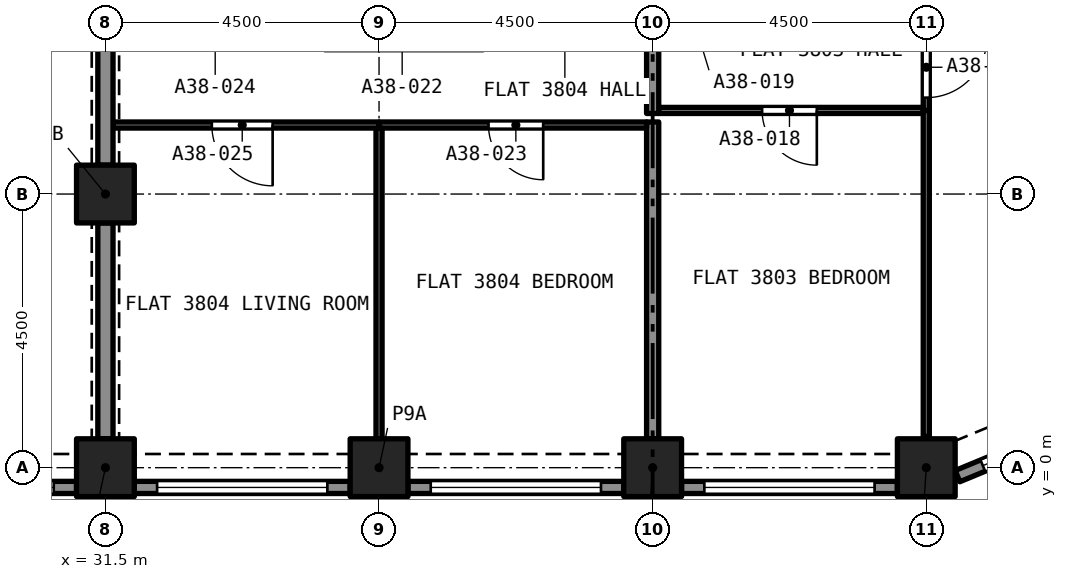
"""IFC4 building model, lengths in metres.
Left out: names, types, materials, properties, quantities, classifications, styles, units other than length and angle.
Written with IfcOpenShell. Run it as: python <this file> out.ifc"""

import sys

from ifc_helpers import new_model, si_unit, direction, frame, frame_2d, origin, origin_2d, place, context, subcontext, project, spatial, rectangle, extrude, element, fill, save


model = new_model("IFC4")
c1 = context("Model", 3, precision=1e-05, world=origin(), true_north=direction((0.0, 1.0)))
c2 = subcontext(c1, "Body", "Model", "MODEL_VIEW")
j1 = project(units=[si_unit("LENGTHUNIT", "METRE"), si_unit("PLANEANGLEUNIT", "RADIAN")], contexts=[c1])
p1 = place(None, origin())
s1 = spatial("IfcSite", under=j1, at=p1, CompositionType="ELEMENT")
p2 = place(p1, origin())
s2 = spatial("IfcBuilding", under=s1, at=p2, CompositionType="ELEMENT")
p3 = place(p2, frame((0.0, 0.0, 136.6)))
s3 = spatial("IfcBuildingStorey", under=s2, at=p3, CompositionType="ELEMENT", Elevation=136.6)
for number, where, z_axis, x_axis in (
    (1, (31.5, 0.0, 0.0), (0.0, 0.0, 1.0), (1.0, 0.0, 0.0)),
    (2, (36.0, 0.0, 0.0), (0.0, 0.0, 1.0), (1.0, 0.0, 0.0)),
    (3, (40.5, 0.0, 0.0), (0.0, 0.0, 1.0), (1.0, 0.0, 0.0)),
    (4, (45.0, 0.0, 0.0), (0.0, 0.0, 1.0), (1.0, 0.0, 0.0)),
    (5, (31.5, 4.5, 0.0), (0.0, 0.0, 1.0), (1.0, 0.0, 0.0)),
):
    element("IfcColumn", number, at=place(p3, frame(where, z_axis=z_axis, x_axis=x_axis)), inside=s3, PredefinedType="COLUMN", context=c2, shape_type="SweptSolid", body=[
        extrude(rectangle(XDim=0.95, YDim=0.95, at=origin_2d()), origin(), (0.0, 0.0, 1.0), 3.2),
    ])
p4 = place(p3, frame((31.025, -0.325, 0.0), z_axis=(0.0, 0.0, 1.0), x_axis=(-1.0, 0.0, 0.0)))
e6 = element("IfcWall", 6, at=p4, inside=s3, PredefinedType="SOLIDWALL", context=c2, shape_type="SweptSolid", body=[
    extrude(rectangle(XDim=3.55, YDim=0.2, at=frame_2d((1.775, 0.0))), origin(), (0.0, 0.0, 1.0), 3.2),
])
p5 = place(p4, frame((0.375, 0.0, 0.45)))
e7 = element("IfcOpeningElement", 7, at=p5, cuts=e6, PredefinedType="OPENING", context=c2, shape_type="SweptSolid", body=[
    extrude(rectangle(XDim=2.8, YDim=1.95, at=frame_2d((1.4, 0.975))), frame((0.0, 0.11, 0.0), z_axis=(0.0, -1.0, 0.0), x_axis=(1.0, 0.0, 0.0)), (0.0, 0.0, 1.0), 0.22),
])
p6 = place(p3, frame((35.525, -0.325, 0.0), z_axis=(0.0, 0.0, 1.0), x_axis=(-1.0, 0.0, 0.0)))
e8 = element("IfcWall", 8, at=p6, inside=s3, PredefinedType="SOLIDWALL", context=c2, shape_type="SweptSolid", body=[
    extrude(rectangle(XDim=3.55, YDim=0.2, at=frame_2d((1.775, 0.0))), origin(), (0.0, 0.0, 1.0), 3.2),
])
p7 = place(p6, frame((0.375, 0.0, 0.45)))
e9 = element("IfcOpeningElement", 9, at=p7, cuts=e8, PredefinedType="OPENING", context=c2, shape_type="SweptSolid", body=[
    extrude(rectangle(XDim=2.8, YDim=1.95, at=frame_2d((1.4, 0.975))), frame((0.0, 0.11, 0.0), z_axis=(0.0, -1.0, 0.0), x_axis=(1.0, 0.0, 0.0)), (0.0, 0.0, 1.0), 0.22),
])
p8 = place(p3, frame((40.025, -0.325, 0.0), z_axis=(0.0, 0.0, 1.0), x_axis=(-1.0, 0.0, 0.0)))
e10 = element("IfcWall", 10, at=p8, inside=s3, PredefinedType="SOLIDWALL", context=c2, shape_type="SweptSolid", body=[
    extrude(rectangle(XDim=3.55, YDim=0.2, at=frame_2d((1.775, 0.0))), origin(), (0.0, 0.0, 1.0), 3.2),
])
p9 = place(p8, frame((0.375, 0.0, 0.45)))
e11 = element("IfcOpeningElement", 11, at=p9, cuts=e10, PredefinedType="OPENING", context=c2, shape_type="SweptSolid", body=[
    extrude(rectangle(XDim=2.8, YDim=1.95, at=frame_2d((1.4, 0.975))), frame((0.0, 0.11, 0.0), z_axis=(0.0, -1.0, 0.0), x_axis=(1.0, 0.0, 0.0)), (0.0, 0.0, 1.0), 0.22),
])
p10 = place(p3, frame((44.525, -0.325, 0.0), z_axis=(0.0, 0.0, 1.0), x_axis=(-1.0, 0.0, 0.0)))
e12 = element("IfcWall", 12, at=p10, inside=s3, PredefinedType="SOLIDWALL", context=c2, shape_type="SweptSolid", body=[
    extrude(rectangle(XDim=3.55, YDim=0.2, at=frame_2d((1.775, 0.0))), origin(), (0.0, 0.0, 1.0), 3.2),
])
p11 = place(p10, frame((0.375, 0.0, 0.45)))
e13 = element("IfcOpeningElement", 13, at=p11, cuts=e12, PredefinedType="OPENING", context=c2, shape_type="SweptSolid", body=[
    extrude(rectangle(XDim=2.8, YDim=1.95, at=frame_2d((1.4, 0.975))), frame((0.0, 0.11, 0.0), z_axis=(0.0, -1.0, 0.0), x_axis=(1.0, 0.0, 0.0)), (0.0, 0.0, 1.0), 0.22),
])
p12 = place(p3, frame((47.733, 0.78, 0.0), z_axis=(0.0, 0.0, 1.0), x_axis=(-0.923880599843, -0.382680855588, 0.0)))
e14 = element("IfcWall", 14, at=p12, inside=s3, PredefinedType="SOLIDWALL", context=c2, shape_type="SweptSolid", body=[
    extrude(rectangle(XDim=2.403, YDim=0.2, at=frame_2d((1.201, 0.0))), origin(), (0.0, 0.0, 1.0), 3.2),
])
p13 = place(p12, frame((0.251, 0.0, 0.45)))
e15 = element("IfcOpeningElement", 15, at=p13, cuts=e14, PredefinedType="OPENING", context=c2, shape_type="SweptSolid", body=[
    extrude(rectangle(XDim=1.7, YDim=1.95, at=frame_2d((0.85, 0.975))), frame((0.0, 0.11, 0.0), z_axis=(0.0, -1.0, 0.0), x_axis=(1.0, 0.0, 0.0)), (0.0, 0.0, 1.0), 0.22),
])
p14 = place(p3, frame((44.95, 5.875, 0.0), z_axis=(0.0, 0.0, 1.0), x_axis=(-1.0, 0.0, 0.0)))
e16 = element("IfcWall", 16, at=p14, inside=s3, PredefinedType="PARTITIONING", context=c2, shape_type="SweptSolid", body=[
    extrude(rectangle(XDim=4.35, YDim=0.1, at=frame_2d((2.175, 0.0))), origin(), (0.0, 0.0, 1.0), 2.9),
])
p15 = place(p14, frame((1.75, 0.0, 0.0)))
e17 = element("IfcOpeningElement", 17, at=p15, cuts=e16, PredefinedType="OPENING", context=c2, shape_type="SweptSolid", body=[
    extrude(rectangle(XDim=0.9, YDim=2.1, at=frame_2d((0.45, 1.05))), frame((0.0, 0.06, 0.0), z_axis=(0.0, -1.0, 0.0), x_axis=(1.0, 0.0, 0.0)), (0.0, 0.0, 1.0), 0.12),
])
p16 = place(p3, frame((45.0, 0.514, 0.0), z_axis=(0.0, 0.0, 1.0), x_axis=(0.0, 1.0, 0.0)))
e18 = element("IfcWall", 18, at=p16, inside=s3, PredefinedType="PARTITIONING", context=c2, shape_type="SweptSolid", body=[
    extrude(rectangle(XDim=5.361, YDim=0.1, at=frame_2d((2.68, 0.0))), origin(), (0.0, 0.0, 1.0), 2.9),
])
p17 = place(p3, frame((40.5, 0.475, 0.0), z_axis=(0.0, 0.0, 1.0), x_axis=(0.0, 1.0, 0.0)))
e19 = element("IfcWall", 19, at=p17, inside=s3, PredefinedType="PARTITIONING", context=c2, shape_type="SweptSolid", body=[
    extrude(rectangle(XDim=5.21, YDim=0.2, at=frame_2d((2.605, 0.0))), origin(), (0.0, 0.0, 1.0), 2.9),
])
p18 = place(p3, frame((45.0, 13.9, 0.0), z_axis=(0.0, 0.0, 1.0), x_axis=(0.0, -1.0, 0.0)))
e20 = element("IfcWall", 20, at=p18, inside=s3, PredefinedType="PARTITIONING", context=c2, shape_type="SweptSolid", body=[
    extrude(rectangle(XDim=8.025, YDim=0.1, at=frame_2d((4.012, 0.0))), origin(), (0.0, 0.0, 1.0), 2.9),
])
p19 = place(p18, frame((6.815, 0.0, 0.0)))
e21 = element("IfcOpeningElement", 21, at=p19, cuts=e20, PredefinedType="OPENING", context=c2, shape_type="SweptSolid", body=[
    extrude(rectangle(XDim=1.0, YDim=2.1, at=frame_2d((0.5, 1.05))), frame((0.0, 0.06, 0.0), z_axis=(0.0, -1.0, 0.0), x_axis=(1.0, 0.0, 0.0)), (0.0, 0.0, 1.0), 0.12),
])
p20 = place(p3, frame((40.5, 5.825, 0.0), z_axis=(0.0, 0.0, 1.0), x_axis=(0.0, 1.0, 0.0)))
e22 = element("IfcWall", 22, at=p20, inside=s3, PredefinedType="PARTITIONING", context=c2, shape_type="SweptSolid", body=[
    extrude(rectangle(XDim=8.075, YDim=0.2, at=frame_2d((4.038, 0.0))), origin(), (0.0, 0.0, 1.0), 2.9),
])
p21 = place(p3, frame((40.4, 5.635, 0.0), z_axis=(0.0, 0.0, 1.0), x_axis=(-1.0, 0.0, 0.0)))
e23 = element("IfcWall", 23, at=p21, inside=s3, PredefinedType="PARTITIONING", context=c2, shape_type="SweptSolid", body=[
    extrude(rectangle(XDim=4.4, YDim=0.1, at=frame_2d((2.2, 0.0))), origin(), (0.0, 0.0, 1.0), 2.9),
])
p22 = place(p21, frame((1.7, 0.0, 0.0)))
e24 = element("IfcOpeningElement", 24, at=p22, cuts=e23, PredefinedType="OPENING", context=c2, shape_type="SweptSolid", body=[
    extrude(rectangle(XDim=0.9, YDim=2.1, at=frame_2d((0.45, 1.05))), frame((0.0, 0.06, 0.0), z_axis=(0.0, -1.0, 0.0), x_axis=(1.0, 0.0, 0.0)), (0.0, 0.0, 1.0), 0.12),
])
p23 = place(p3, frame((36.0, 0.475, 0.0), z_axis=(0.0, 0.0, 1.0), x_axis=(0.0, 1.0, 0.0)))
e25 = element("IfcWall", 25, at=p23, inside=s3, PredefinedType="PARTITIONING", context=c2, shape_type="SweptSolid", body=[
    extrude(rectangle(XDim=5.11, YDim=0.1, at=frame_2d((2.555, 0.0))), origin(), (0.0, 0.0, 1.0), 2.9),
])
p24 = place(p3, frame((36.0, 5.635, 0.0), z_axis=(0.0, 0.0, 1.0), x_axis=(-1.0, 0.0, 0.0)))
e26 = element("IfcWall", 26, at=p24, inside=s3, PredefinedType="PARTITIONING", context=c2, shape_type="SweptSolid", body=[
    extrude(rectangle(XDim=4.375, YDim=0.1, at=frame_2d((2.188, 0.0))), origin(), (0.0, 0.0, 1.0), 2.9),
])
p25 = place(p24, frame((1.75, 0.0, 0.0)))
e27 = element("IfcOpeningElement", 27, at=p25, cuts=e26, PredefinedType="OPENING", context=c2, shape_type="SweptSolid", body=[
    extrude(rectangle(XDim=1.0, YDim=2.1, at=frame_2d((0.5, 1.05))), frame((0.0, 0.06, 0.0), z_axis=(0.0, -1.0, 0.0), x_axis=(1.0, 0.0, 0.0)), (0.0, 0.0, 1.0), 0.12),
])
for number, where, z_axis, x_axis in (
    (28, (31.5, 0.475, 0.0), (0.0, 0.0, 1.0), (0.0, 1.0, 0.0)),
    (29, (31.5, 4.975, 0.0), (0.0, 0.0, 1.0), (0.0, 1.0, 0.0)),
):
    element("IfcWall", number, at=place(p3, frame(where, z_axis=z_axis, x_axis=x_axis)), inside=s3, PredefinedType="PARTITIONING", context=c2, shape_type="SweptSolid", body=[
        extrude(rectangle(XDim=3.55, YDim=0.25, at=frame_2d((1.775, 0.0))), origin(), (0.0, 0.0, 1.0), 2.38),
    ])
p26 = place(p5, origin())
e30 = element("IfcWindow", 30, at=p26, inside=s3, PartitioningType="SINGLE_PANEL", PredefinedType="WINDOW", context=c2, shape_type="SweptSolid", body=[
    extrude(rectangle(XDim=2.8, YDim=1.95, at=frame_2d((1.4, 0.975))), frame((0.0, 0.03, 0.0), z_axis=(0.0, -1.0, 0.0), x_axis=(1.0, 0.0, 0.0)), (0.0, 0.0, 1.0), 0.06),
])
fill(e7, e30)
p27 = place(p7, origin())
e31 = element("IfcWindow", 31, at=p27, inside=s3, PartitioningType="SINGLE_PANEL", PredefinedType="WINDOW", context=c2, shape_type="SweptSolid", body=[
    extrude(rectangle(XDim=2.8, YDim=1.95, at=frame_2d((1.4, 0.975))), frame((0.0, 0.03, 0.0), z_axis=(0.0, -1.0, 0.0), x_axis=(1.0, 0.0, 0.0)), (0.0, 0.0, 1.0), 0.06),
])
fill(e9, e31)
p28 = place(p9, origin())
e32 = element("IfcWindow", 32, at=p28, inside=s3, PartitioningType="SINGLE_PANEL", PredefinedType="WINDOW", context=c2, shape_type="SweptSolid", body=[
    extrude(rectangle(XDim=2.8, YDim=1.95, at=frame_2d((1.4, 0.975))), frame((0.0, 0.03, 0.0), z_axis=(0.0, -1.0, 0.0), x_axis=(1.0, 0.0, 0.0)), (0.0, 0.0, 1.0), 0.06),
])
fill(e11, e32)
p29 = place(p11, origin())
e33 = element("IfcWindow", 33, at=p29, inside=s3, PartitioningType="SINGLE_PANEL", PredefinedType="WINDOW", context=c2, shape_type="SweptSolid", body=[
    extrude(rectangle(XDim=2.8, YDim=1.95, at=frame_2d((1.4, 0.975))), frame((0.0, 0.03, 0.0), z_axis=(0.0, -1.0, 0.0), x_axis=(1.0, 0.0, 0.0)), (0.0, 0.0, 1.0), 0.06),
])
fill(e13, e33)
p30 = place(p13, origin())
e34 = element("IfcWindow", 34, at=p30, inside=s3, PartitioningType="SINGLE_PANEL", PredefinedType="WINDOW", context=c2, shape_type="SweptSolid", body=[
    extrude(rectangle(XDim=1.7, YDim=1.95, at=frame_2d((0.85, 0.975))), frame((0.0, 0.03, 0.0), z_axis=(0.0, -1.0, 0.0), x_axis=(1.0, 0.0, 0.0)), (0.0, 0.0, 1.0), 0.06),
])
fill(e15, e34)
p31 = place(p15, origin())
e35 = element("IfcDoor", 35, at=p31, inside=s3, OperationType="SINGLE_SWING_RIGHT", PredefinedType="DOOR", context=c2, shape_type="SweptSolid", body=[
    extrude(rectangle(XDim=0.9, YDim=2.1, at=frame_2d((0.45, 1.05))), frame((0.0, 0.025, 0.0), z_axis=(0.0, -1.0, 0.0), x_axis=(1.0, 0.0, 0.0)), (0.0, 0.0, 1.0), 0.05),
])
fill(e17, e35)
p32 = place(p19, origin())
e36 = element("IfcDoor", 36, at=p32, inside=s3, OperationType="SINGLE_SWING_RIGHT", PredefinedType="DOOR", context=c2, shape_type="SweptSolid", body=[
    extrude(rectangle(XDim=1.0, YDim=2.1, at=frame_2d((0.5, 1.05))), frame((0.0, 0.025, 0.0), z_axis=(0.0, -1.0, 0.0), x_axis=(1.0, 0.0, 0.0)), (0.0, 0.0, 1.0), 0.05),
])
fill(e21, e36)
p33 = place(p22, origin())
e37 = element("IfcDoor", 37, at=p33, inside=s3, OperationType="SINGLE_SWING_LEFT", PredefinedType="DOOR", context=c2, shape_type="SweptSolid", body=[
    extrude(rectangle(XDim=0.9, YDim=2.1, at=frame_2d((0.45, 1.05))), frame((0.0, 0.025, 0.0), z_axis=(0.0, -1.0, 0.0), x_axis=(1.0, 0.0, 0.0)), (0.0, 0.0, 1.0), 0.05),
])
fill(e24, e37)
p34 = place(p25, origin())
e38 = element("IfcDoor", 38, at=p34, inside=s3, OperationType="SINGLE_SWING_RIGHT", PredefinedType="DOOR", context=c2, shape_type="SweptSolid", body=[
    extrude(rectangle(XDim=1.0, YDim=2.1, at=frame_2d((0.5, 1.05))), frame((0.0, 0.025, 0.0), z_axis=(0.0, -1.0, 0.0), x_axis=(1.0, 0.0, 0.0)), (0.0, 0.0, 1.0), 0.05),
])
fill(e27, e38)
save(model, sys.argv[1])
